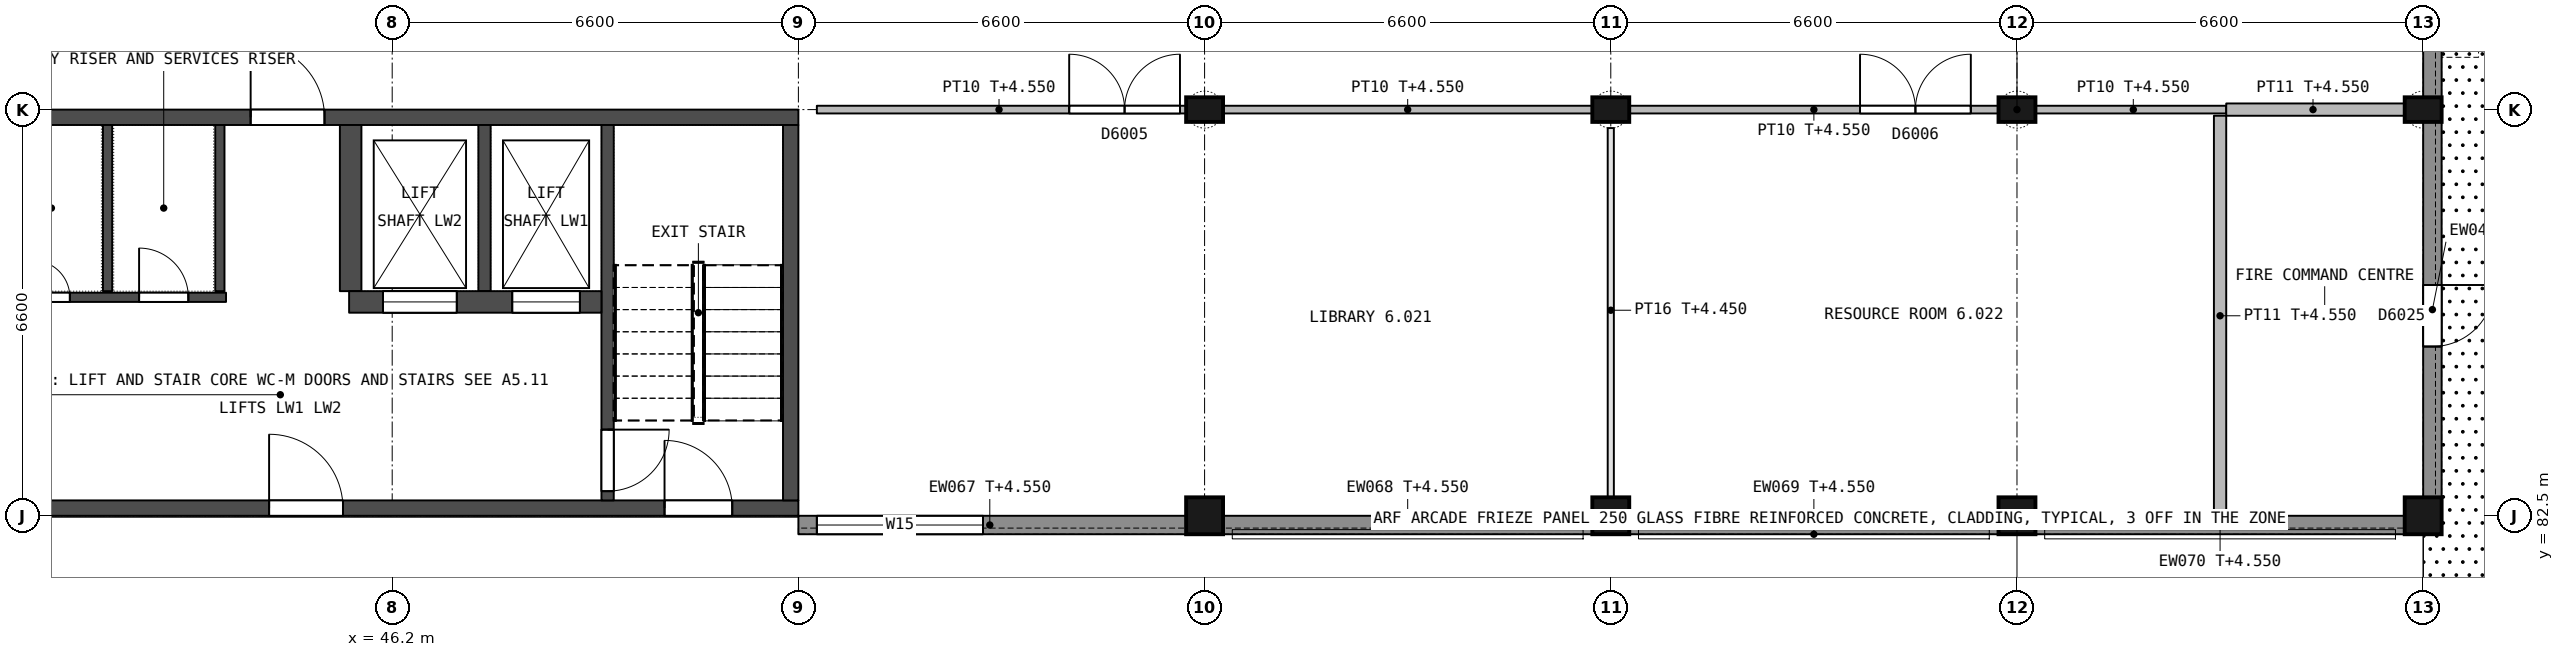
"""IFC4 building model, lengths in metres.
Left out: names, types, materials, properties, quantities, classifications, styles, units other than length and angle.
Written with IfcOpenShell. Run it as: python <this file> out.ifc"""

import sys

from ifc_helpers import new_model, si_unit, direction, frame, frame_2d, origin, origin_2d, place, context, subcontext, project, spatial, rectangle, extrude, element, fill, save


model = new_model("IFC4")
c1 = context("Model", 3, precision=1e-05, world=origin(), true_north=direction((0.0, 1.0)))
c2 = subcontext(c1, "Body", "Model", "MODEL_VIEW")
j1 = project(units=[si_unit("LENGTHUNIT", "METRE"), si_unit("PLANEANGLEUNIT", "RADIAN")], contexts=[c1])
p1 = place(None, origin())
s1 = spatial("IfcSite", under=j1, at=p1, CompositionType="ELEMENT")
p2 = place(p1, origin())
s2 = spatial("IfcBuilding", under=s1, at=p2, CompositionType="ELEMENT")
p3 = place(p2, origin())
s3 = spatial("IfcBuildingStorey", under=s2, at=p3, CompositionType="ELEMENT", Elevation=0.0)
p4 = place(p3, frame((59.4, 82.5, 0.0), z_axis=(0.0, 0.0, 1.0), x_axis=(1.0, 0.0, 0.0)))
e1 = element("IfcColumn", 1, at=p4, inside=s3, PredefinedType="COLUMN", context=c2, shape_type="SweptSolid", body=[
    extrude(rectangle(XDim=0.6, YDim=0.6, at=origin_2d()), origin(), (0.0, 0.0, 1.0), 5.4),
])
p5 = place(p3, frame((59.4, 89.1, 0.0), z_axis=(0.0, 0.0, 1.0), x_axis=(1.0, 0.0, 0.0)))
e2 = element("IfcColumn", 2, at=p5, inside=s3, PredefinedType="COLUMN", context=c2, shape_type="SweptSolid", body=[
    extrude(rectangle(XDim=0.6, YDim=0.4, at=origin_2d()), origin(), (0.0, 0.0, 1.0), 5.4),
])
p6 = place(p3, frame((66.0, 82.5, 0.0), z_axis=(0.0, 0.0, 1.0), x_axis=(1.0, 0.0, 0.0)))
e3 = element("IfcColumn", 3, at=p6, inside=s3, PredefinedType="COLUMN", context=c2, shape_type="SweptSolid", body=[
    extrude(rectangle(XDim=0.6, YDim=0.6, at=origin_2d()), origin(), (0.0, 0.0, 1.0), 5.4),
])
p7 = place(p3, frame((66.0, 89.1, 0.0), z_axis=(0.0, 0.0, 1.0), x_axis=(1.0, 0.0, 0.0)))
e4 = element("IfcColumn", 4, at=p7, inside=s3, PredefinedType="COLUMN", context=c2, shape_type="SweptSolid", body=[
    extrude(rectangle(XDim=0.6, YDim=0.4, at=origin_2d()), origin(), (0.0, 0.0, 1.0), 5.4),
])
p8 = place(p3, frame((72.6, 82.5, 0.0), z_axis=(0.0, 0.0, 1.0), x_axis=(1.0, 0.0, 0.0)))
e5 = element("IfcColumn", 5, at=p8, inside=s3, PredefinedType="COLUMN", context=c2, shape_type="SweptSolid", body=[
    extrude(rectangle(XDim=0.6, YDim=0.6, at=origin_2d()), origin(), (0.0, 0.0, 1.0), 5.4),
])
p9 = place(p3, frame((72.6, 89.1, 0.0), z_axis=(0.0, 0.0, 1.0), x_axis=(1.0, 0.0, 0.0)))
e6 = element("IfcColumn", 6, at=p9, inside=s3, PredefinedType="COLUMN", context=c2, shape_type="SweptSolid", body=[
    extrude(rectangle(XDim=0.6, YDim=0.4, at=origin_2d()), origin(), (0.0, 0.0, 1.0), 5.4),
])
p10 = place(p3, frame((79.2, 82.5, 0.0), z_axis=(0.0, 0.0, 1.0), x_axis=(1.0, 0.0, 0.0)))
e7 = element("IfcColumn", 7, at=p10, inside=s3, PredefinedType="COLUMN", context=c2, shape_type="SweptSolid", body=[
    extrude(rectangle(XDim=0.6, YDim=0.6, at=origin_2d()), origin(), (0.0, 0.0, 1.0), 5.4),
])
p11 = place(p3, frame((79.2, 89.1, 0.0), z_axis=(0.0, 0.0, 1.0), x_axis=(1.0, 0.0, 0.0)))
e8 = element("IfcColumn", 8, at=p11, inside=s3, PredefinedType="COLUMN", context=c2, shape_type="SweptSolid", body=[
    extrude(rectangle(XDim=0.6, YDim=0.4, at=origin_2d()), origin(), (0.0, 0.0, 1.0), 5.4),
])
p12 = place(p3, frame((52.8, 88.975, 0.0), z_axis=(0.0, 0.0, 1.0), x_axis=(-1.0, 0.0, 0.0)))
e9 = element("IfcWall", 9, at=p12, inside=s3, PredefinedType="SHEAR", context=c2, shape_type="SweptSolid", body=[
    extrude(rectangle(XDim=13.2, YDim=0.25, at=frame_2d((6.6, 0.0))), origin(), (0.0, 0.0, 1.0), 5.15),
])
p13 = place(p12, frame((7.7, 0.0, 0.0)))
e10 = element("IfcOpeningElement", 10, at=p13, cuts=e9, PredefinedType="OPENING", context=c2, shape_type="SweptSolid", body=[
    extrude(rectangle(XDim=1.2, YDim=2.1, at=frame_2d((0.6, 1.05))), frame((0.0, 0.135, 0.0), z_axis=(0.0, -1.0, 0.0), x_axis=(1.0, 0.0, 0.0)), (0.0, 0.0, 1.0), 0.27),
])
p14 = place(p3, frame((52.8, 82.625, 0.0), z_axis=(0.0, 0.0, 1.0), x_axis=(-1.0, 0.0, 0.0)))
e11 = element("IfcWall", 11, at=p14, inside=s3, PredefinedType="SHEAR", context=c2, shape_type="SweptSolid", body=[
    extrude(rectangle(XDim=13.2, YDim=0.25, at=frame_2d((6.6, 0.0))), origin(), (0.0, 0.0, 1.0), 5.15),
])
p15 = place(p14, frame((7.4, 0.0, 0.0)))
e12 = element("IfcOpeningElement", 12, at=p15, cuts=e11, PredefinedType="OPENING", context=c2, shape_type="SweptSolid", body=[
    extrude(rectangle(XDim=1.2, YDim=2.4, at=frame_2d((0.6, 1.2))), frame((0.0, 0.135, 0.0), z_axis=(0.0, -1.0, 0.0), x_axis=(1.0, 0.0, 0.0)), (0.0, 0.0, 1.0), 0.27),
])
p16 = place(p14, frame((1.075, 0.0, 0.0)))
e13 = element("IfcOpeningElement", 13, at=p16, cuts=e11, PredefinedType="OPENING", context=c2, shape_type="SweptSolid", body=[
    extrude(rectangle(XDim=1.1, YDim=2.4, at=frame_2d((0.55, 1.2))), frame((0.0, 0.135, 0.0), z_axis=(0.0, -1.0, 0.0), x_axis=(1.0, 0.0, 0.0)), (0.0, 0.0, 1.0), 0.27),
])
p17 = place(p3, frame((52.675, 88.85, 0.0), z_axis=(0.0, 0.0, 1.0), x_axis=(0.0, -1.0, 0.0)))
e14 = element("IfcWall", 14, at=p17, inside=s3, PredefinedType="SHEAR", context=c2, shape_type="SweptSolid", body=[
    extrude(rectangle(XDim=6.1, YDim=0.25, at=frame_2d((3.05, 0.0))), origin(), (0.0, 0.0, 1.0), 5.15),
])
p18 = place(p3, frame((49.7, 88.85, 0.0), z_axis=(0.0, 0.0, 1.0), x_axis=(0.0, -1.0, 0.0)))
e15 = element("IfcWall", 15, at=p18, inside=s3, PredefinedType="SHEAR", context=c2, shape_type="SweptSolid", body=[
    extrude(rectangle(XDim=6.1, YDim=0.2, at=frame_2d((3.05, 0.0))), origin(), (0.0, 0.0, 1.0), 5.15),
])
p19 = place(p18, frame((4.95, 0.0, 0.0)))
e16 = element("IfcOpeningElement", 16, at=p19, cuts=e15, PredefinedType="OPENING", context=c2, shape_type="SweptSolid", body=[
    extrude(rectangle(XDim=1.0, YDim=2.2, at=frame_2d((0.5, 1.1))), frame((0.0, 0.11, 0.0), z_axis=(0.0, -1.0, 0.0), x_axis=(1.0, 0.0, 0.0)), (0.0, 0.0, 1.0), 0.22),
])
p20 = place(p3, frame((47.7, 88.85, 0.0), z_axis=(0.0, 0.0, 1.0), x_axis=(0.0, -1.0, 0.0)))
e17 = element("IfcWall", 17, at=p20, inside=s3, PredefinedType="SHEAR", context=c2, shape_type="SweptSolid", body=[
    extrude(rectangle(XDim=2.7, YDim=0.2, at=frame_2d((1.35, 0.0))), origin(), (0.0, 0.0, 1.0), 5.15),
])
p21 = place(p3, frame((45.525, 88.85, 0.0), z_axis=(0.0, 0.0, 1.0), x_axis=(0.0, -1.0, 0.0)))
e18 = element("IfcWall", 18, at=p21, inside=s3, PredefinedType="SHEAR", context=c2, shape_type="SweptSolid", body=[
    extrude(rectangle(XDim=2.7, YDim=0.35, at=frame_2d((1.35, 0.0))), origin(), (0.0, 0.0, 1.0), 5.15),
])
p22 = place(p3, frame((49.6, 85.975, 0.0), z_axis=(0.0, 0.0, 1.0), x_axis=(-1.0, 0.0, 0.0)))
e19 = element("IfcWall", 19, at=p22, inside=s3, PredefinedType="SHEAR", context=c2, shape_type="SweptSolid", body=[
    extrude(rectangle(XDim=4.1, YDim=0.35, at=frame_2d((2.05, 0.0))), origin(), (0.0, 0.0, 1.0), 5.15),
])
p23 = place(p22, frame((0.35, 0.0, 0.0)))
e20 = element("IfcOpeningElement", 20, at=p23, cuts=e19, PredefinedType="OPENING", context=c2, shape_type="SweptSolid", body=[
    extrude(rectangle(XDim=1.1, YDim=2.2, at=frame_2d((0.55, 1.1))), frame((0.0, 0.185, 0.0), z_axis=(0.0, -1.0, 0.0), x_axis=(1.0, 0.0, 0.0)), (0.0, 0.0, 1.0), 0.37),
])
p24 = place(p22, frame((2.35, 0.0, 0.0)))
e21 = element("IfcOpeningElement", 21, at=p24, cuts=e19, PredefinedType="OPENING", context=c2, shape_type="SweptSolid", body=[
    extrude(rectangle(XDim=1.2, YDim=2.3, at=frame_2d((0.6, 1.15))), frame((0.0, 0.185, 0.0), z_axis=(0.0, -1.0, 0.0), x_axis=(1.0, 0.0, 0.0)), (0.0, 0.0, 1.0), 0.37),
])
p25 = place(p3, frame((43.4, 88.85, 0.0), z_axis=(0.0, 0.0, 1.0), x_axis=(0.0, -1.0, 0.0)))
e22 = element("IfcWall", 22, at=p25, inside=s3, PredefinedType="SHEAR", context=c2, shape_type="SweptSolid", body=[
    extrude(rectangle(XDim=2.7, YDim=0.15, at=frame_2d((1.35, 0.0))), origin(), (0.0, 0.0, 1.0), 5.15),
])
p26 = place(p3, frame((43.5, 86.05, 0.0), z_axis=(0.0, 0.0, 1.0), x_axis=(-1.0, 0.0, 0.0)))
e23 = element("IfcWall", 23, at=p26, inside=s3, PredefinedType="SHEAR", context=c2, shape_type="SweptSolid", body=[
    extrude(rectangle(XDim=3.65, YDim=0.15, at=frame_2d((1.825, 0.0))), origin(), (0.0, 0.0, 1.0), 5.15),
])
p27 = place(p26, frame((0.613, 0.0, 0.0)))
e24 = element("IfcOpeningElement", 24, at=p27, cuts=e23, PredefinedType="OPENING", context=c2, shape_type="SweptSolid", body=[
    extrude(rectangle(XDim=0.8, YDim=2.0, at=frame_2d((0.4, 1.0))), frame((0.0, 0.085, 0.0), z_axis=(0.0, -1.0, 0.0), x_axis=(1.0, 0.0, 0.0)), (0.0, 0.0, 1.0), 0.17),
])
p28 = place(p26, frame((2.538, 0.0, 0.0)))
e25 = element("IfcOpeningElement", 25, at=p28, cuts=e23, PredefinedType="OPENING", context=c2, shape_type="SweptSolid", body=[
    extrude(rectangle(XDim=0.6, YDim=2.1, at=frame_2d((0.3, 1.05))), frame((0.0, 0.085, 0.0), z_axis=(0.0, -1.0, 0.0), x_axis=(1.0, 0.0, 0.0)), (0.0, 0.0, 1.0), 0.17),
])
p29 = place(p3, frame((41.575, 88.85, 0.0), z_axis=(0.0, 0.0, 1.0), x_axis=(0.0, -1.0, 0.0)))
e26 = element("IfcWall", 26, at=p29, inside=s3, PredefinedType="SHEAR", context=c2, shape_type="SweptSolid", body=[
    extrude(rectangle(XDim=2.7, YDim=0.15, at=frame_2d((1.35, 0.0))), origin(), (0.0, 0.0, 1.0), 5.15),
])
p30 = place(p3, frame((79.35, 88.9, 0.0), z_axis=(0.0, 0.0, 1.0), x_axis=(0.0, -1.0, 0.0)))
e27 = element("IfcWall", 27, at=p30, inside=s3, PredefinedType="STANDARD", context=c2, shape_type="SweptSolid", body=[
    extrude(rectangle(XDim=6.1, YDim=0.3, at=frame_2d((3.05, 0.0))), origin(), (0.0, 0.0, 1.0), 4.55),
])
p31 = place(p30, frame((2.65, 0.0, 0.0)))
e28 = element("IfcOpeningElement", 28, at=p31, cuts=e27, PredefinedType="OPENING", context=c2, shape_type="SweptSolid", body=[
    extrude(rectangle(XDim=1.0, YDim=2.1, at=frame_2d((0.5, 1.05))), frame((0.0, 0.16, 0.0), z_axis=(0.0, -1.0, 0.0), x_axis=(1.0, 0.0, 0.0)), (0.0, 0.0, 1.0), 0.32),
])
p32 = place(p3, frame((79.35, 92.4, 0.0), z_axis=(0.0, 0.0, 1.0), x_axis=(0.0, -1.0, 0.0)))
e29 = element("IfcWall", 29, at=p32, inside=s3, PredefinedType="STANDARD", context=c2, shape_type="SweptSolid", body=[
    extrude(rectangle(XDim=3.1, YDim=0.3, at=frame_2d((1.55, 0.0))), origin(), (0.0, 0.0, 1.0), 4.55),
])
p33 = place(p32, frame((1.05, 0.0, 1.1)))
e30 = element("IfcOpeningElement", 30, at=p33, cuts=e29, PredefinedType="OPENING", context=c2, shape_type="SweptSolid", body=[
    extrude(rectangle(XDim=1.2, YDim=1.2, at=frame_2d((0.6, 0.6))), frame((0.0, 0.16, 0.0), z_axis=(0.0, -1.0, 0.0), x_axis=(1.0, 0.0, 0.0)), (0.0, 0.0, 1.0), 0.32),
])
p34 = place(p3, frame((59.1, 82.35, 0.0), z_axis=(0.0, 0.0, 1.0), x_axis=(-1.0, 0.0, 0.0)))
e31 = element("IfcWall", 31, at=p34, inside=s3, PredefinedType="STANDARD", context=c2, shape_type="SweptSolid", body=[
    extrude(rectangle(XDim=6.3, YDim=0.3, at=frame_2d((3.15, 0.0))), origin(), (0.0, 0.0, 1.0), 4.55),
])
p35 = place(p34, frame((3.3, 0.0, 0.6)))
e32 = element("IfcOpeningElement", 32, at=p35, cuts=e31, PredefinedType="OPENING", context=c2, shape_type="SweptSolid", body=[
    extrude(rectangle(XDim=2.7, YDim=2.1, at=frame_2d((1.35, 1.05))), frame((0.0, 0.16, 0.0), z_axis=(0.0, -1.0, 0.0), x_axis=(1.0, 0.0, 0.0)), (0.0, 0.0, 1.0), 0.32),
])
for number, where, z_axis, x_axis in (
    (33, (65.7, 82.35, 0.0), (0.0, 0.0, 1.0), (-1.0, 0.0, 0.0)),
    (34, (72.3, 82.35, 0.0), (0.0, 0.0, 1.0), (-1.0, 0.0, 0.0)),
    (35, (78.9, 82.35, 0.0), (0.0, 0.0, 1.0), (-1.0, 0.0, 0.0)),
):
    element("IfcWall", number, at=place(p3, frame(where, z_axis=z_axis, x_axis=x_axis)), inside=s3, PredefinedType="STANDARD", context=c2, shape_type="SweptSolid", body=[
        extrude(rectangle(XDim=6.0, YDim=0.3, at=frame_2d((3.0, 0.0))), origin(), (0.0, 0.0, 1.0), 4.55),
    ])
p36 = place(p3, frame((53.1, 89.1, 0.0), z_axis=(0.0, 0.0, 1.0), x_axis=(1.0, 0.0, 0.0)))
e36 = element("IfcWall", 36, at=p36, inside=s3, PredefinedType="PARTITIONING", context=c2, shape_type="SweptSolid", body=[
    extrude(rectangle(XDim=6.0, YDim=0.125, at=frame_2d((3.0, 0.0))), origin(), (0.0, 0.0, 1.0), 4.55),
])
p37 = place(p36, frame((4.1, 0.0, 0.0)))
e37 = element("IfcOpeningElement", 37, at=p37, cuts=e36, PredefinedType="OPENING", context=c2, shape_type="SweptSolid", body=[
    extrude(rectangle(XDim=1.8, YDim=2.1, at=frame_2d((0.9, 1.05))), frame((0.0, 0.073, 0.0), z_axis=(0.0, -1.0, 0.0), x_axis=(1.0, 0.0, 0.0)), (0.0, 0.0, 1.0), 0.145),
])
p38 = place(p3, frame((59.7, 89.1, 0.0), z_axis=(0.0, 0.0, 1.0), x_axis=(1.0, 0.0, 0.0)))
e38 = element("IfcWall", 38, at=p38, inside=s3, PredefinedType="PARTITIONING", context=c2, shape_type="SweptSolid", body=[
    extrude(rectangle(XDim=6.0, YDim=0.125, at=frame_2d((3.0, 0.0))), origin(), (0.0, 0.0, 1.0), 4.55),
])
p39 = place(p3, frame((66.3, 89.1, 0.0), z_axis=(0.0, 0.0, 1.0), x_axis=(1.0, 0.0, 0.0)))
e39 = element("IfcWall", 39, at=p39, inside=s3, PredefinedType="PARTITIONING", context=c2, shape_type="SweptSolid", body=[
    extrude(rectangle(XDim=6.0, YDim=0.125, at=frame_2d((3.0, 0.0))), origin(), (0.0, 0.0, 1.0), 4.55),
])
p40 = place(p39, frame((3.75, 0.0, 0.0)))
e40 = element("IfcOpeningElement", 40, at=p40, cuts=e39, PredefinedType="OPENING", context=c2, shape_type="SweptSolid", body=[
    extrude(rectangle(XDim=1.8, YDim=2.1, at=frame_2d((0.9, 1.05))), frame((0.0, 0.073, 0.0), z_axis=(0.0, -1.0, 0.0), x_axis=(1.0, 0.0, 0.0)), (0.0, 0.0, 1.0), 0.145),
])
p41 = place(p3, frame((72.9, 89.1, 0.0), z_axis=(0.0, 0.0, 1.0), x_axis=(1.0, 0.0, 0.0)))
e41 = element("IfcWall", 41, at=p41, inside=s3, PredefinedType="PARTITIONING", context=c2, shape_type="SweptSolid", body=[
    extrude(rectangle(XDim=3.1, YDim=0.125, at=frame_2d((1.55, 0.0))), origin(), (0.0, 0.0, 1.0), 4.55),
])
p42 = place(p3, frame((76.0, 89.1, 0.0), z_axis=(0.0, 0.0, 1.0), x_axis=(1.0, 0.0, 0.0)))
e42 = element("IfcWall", 42, at=p42, inside=s3, PredefinedType="PARTITIONING", context=c2, shape_type="SweptSolid", body=[
    extrude(rectangle(XDim=2.9, YDim=0.2, at=frame_2d((1.45, 0.0))), origin(), (0.0, 0.0, 1.0), 4.55),
])
p43 = place(p3, frame((66.0, 82.8, 0.0), z_axis=(0.0, 0.0, 1.0), x_axis=(0.0, 1.0, 0.0)))
e43 = element("IfcWall", 43, at=p43, inside=s3, PredefinedType="PARTITIONING", context=c2, shape_type="SweptSolid", body=[
    extrude(rectangle(XDim=6.0, YDim=0.1, at=frame_2d((3.0, 0.0))), origin(), (0.0, 0.0, 1.0), 4.45),
])
p44 = place(p3, frame((75.9, 82.5, 0.0), z_axis=(0.0, 0.0, 1.0), x_axis=(0.0, 1.0, 0.0)))
e44 = element("IfcWall", 44, at=p44, inside=s3, PredefinedType="PARTITIONING", context=c2, shape_type="SweptSolid", body=[
    extrude(rectangle(XDim=6.5, YDim=0.2, at=frame_2d((3.25, 0.0))), origin(), (0.0, 0.0, 1.0), 4.55),
])
p45 = place(p13, origin())
e45 = element("IfcDoor", 45, at=p45, inside=s3, OperationType="SINGLE_SWING_RIGHT", PredefinedType="DOOR", context=c2, shape_type="SweptSolid", body=[
    extrude(rectangle(XDim=1.2, YDim=2.1, at=frame_2d((0.6, 1.05))), frame((0.0, 0.025, 0.0), z_axis=(0.0, -1.0, 0.0), x_axis=(1.0, 0.0, 0.0)), (0.0, 0.0, 1.0), 0.05),
])
fill(e10, e45)
p46 = place(p27, origin())
e46 = element("IfcDoor", 46, at=p46, inside=s3, OperationType="SINGLE_SWING_RIGHT", PredefinedType="DOOR", context=c2, shape_type="SweptSolid", body=[
    extrude(rectangle(XDim=0.8, YDim=2.0, at=frame_2d((0.4, 1.0))), frame((0.0, 0.025, 0.0), z_axis=(0.0, -1.0, 0.0), x_axis=(1.0, 0.0, 0.0)), (0.0, 0.0, 1.0), 0.05),
])
fill(e24, e46)
p47 = place(p28, origin())
e47 = element("IfcDoor", 47, at=p47, inside=s3, OperationType="SINGLE_SWING_RIGHT", PredefinedType="DOOR", context=c2, shape_type="SweptSolid", body=[
    extrude(rectangle(XDim=0.6, YDim=2.1, at=frame_2d((0.3, 1.05))), frame((0.0, 0.025, 0.0), z_axis=(0.0, -1.0, 0.0), x_axis=(1.0, 0.0, 0.0)), (0.0, 0.0, 1.0), 0.05),
])
fill(e25, e47)
p48 = place(p15, origin())
e48 = element("IfcDoor", 48, at=p48, inside=s3, OperationType="SINGLE_SWING_RIGHT", PredefinedType="DOOR", context=c2, shape_type="SweptSolid", body=[
    extrude(rectangle(XDim=1.2, YDim=2.4, at=frame_2d((0.6, 1.2))), frame((0.0, 0.025, 0.0), z_axis=(0.0, -1.0, 0.0), x_axis=(1.0, 0.0, 0.0)), (0.0, 0.0, 1.0), 0.05),
])
fill(e12, e48)
p49 = place(p19, origin())
e49 = element("IfcDoor", 49, at=p49, inside=s3, OperationType="SINGLE_SWING_LEFT", PredefinedType="DOOR", context=c2, shape_type="SweptSolid", body=[
    extrude(rectangle(XDim=1.0, YDim=2.2, at=frame_2d((0.5, 1.1))), frame((0.0, 0.025, 0.0), z_axis=(0.0, -1.0, 0.0), x_axis=(1.0, 0.0, 0.0)), (0.0, 0.0, 1.0), 0.05),
])
fill(e16, e49)
p50 = place(p16, origin())
e50 = element("IfcDoor", 50, at=p50, inside=s3, OperationType="SINGLE_SWING_RIGHT", PredefinedType="DOOR", context=c2, shape_type="SweptSolid", body=[
    extrude(rectangle(XDim=1.1, YDim=2.4, at=frame_2d((0.55, 1.2))), frame((0.0, 0.025, 0.0), z_axis=(0.0, -1.0, 0.0), x_axis=(1.0, 0.0, 0.0)), (0.0, 0.0, 1.0), 0.05),
])
fill(e13, e50)
p51 = place(p23, origin())
e51 = element("IfcDoor", 51, at=p51, inside=s3, OperationType="DOUBLE_DOOR_SLIDING", PredefinedType="NOTDEFINED", context=c2, shape_type="SweptSolid", body=[
    extrude(rectangle(XDim=1.1, YDim=2.2, at=frame_2d((0.55, 1.1))), frame((0.0, 0.025, 0.0), z_axis=(0.0, -1.0, 0.0), x_axis=(1.0, 0.0, 0.0)), (0.0, 0.0, 1.0), 0.05),
])
fill(e20, e51)
p52 = place(p24, origin())
e52 = element("IfcDoor", 52, at=p52, inside=s3, OperationType="DOUBLE_DOOR_SLIDING", PredefinedType="NOTDEFINED", context=c2, shape_type="SweptSolid", body=[
    extrude(rectangle(XDim=1.2, YDim=2.3, at=frame_2d((0.6, 1.15))), frame((0.0, 0.025, 0.0), z_axis=(0.0, -1.0, 0.0), x_axis=(1.0, 0.0, 0.0)), (0.0, 0.0, 1.0), 0.05),
])
fill(e21, e52)
p53 = place(p35, origin())
e53 = element("IfcWindow", 53, at=p53, inside=s3, PartitioningType="SINGLE_PANEL", PredefinedType="WINDOW", context=c2, shape_type="SweptSolid", body=[
    extrude(rectangle(XDim=2.7, YDim=2.1, at=frame_2d((1.35, 1.05))), frame((0.0, 0.03, 0.0), z_axis=(0.0, -1.0, 0.0), x_axis=(1.0, 0.0, 0.0)), (0.0, 0.0, 1.0), 0.06),
])
fill(e32, e53)
p54 = place(p37, origin())
e54 = element("IfcDoor", 54, at=p54, inside=s3, OperationType="DOUBLE_DOOR_SINGLE_SWING", PredefinedType="DOOR", context=c2, shape_type="SweptSolid", body=[
    extrude(rectangle(XDim=1.8, YDim=2.1, at=frame_2d((0.9, 1.05))), frame((0.0, 0.025, 0.0), z_axis=(0.0, -1.0, 0.0), x_axis=(1.0, 0.0, 0.0)), (0.0, 0.0, 1.0), 0.05),
])
fill(e37, e54)
p55 = place(p40, origin())
e55 = element("IfcDoor", 55, at=p55, inside=s3, OperationType="DOUBLE_DOOR_SINGLE_SWING", PredefinedType="DOOR", context=c2, shape_type="SweptSolid", body=[
    extrude(rectangle(XDim=1.8, YDim=2.1, at=frame_2d((0.9, 1.05))), frame((0.0, 0.025, 0.0), z_axis=(0.0, -1.0, 0.0), x_axis=(1.0, 0.0, 0.0)), (0.0, 0.0, 1.0), 0.05),
])
fill(e40, e55)
p56 = place(p31, origin())
e56 = element("IfcDoor", 56, at=p56, inside=s3, OperationType="SINGLE_SWING_LEFT", PredefinedType="DOOR", context=c2, shape_type="SweptSolid", body=[
    extrude(rectangle(XDim=1.0, YDim=2.1, at=frame_2d((0.5, 1.05))), frame((0.0, 0.025, 0.0), z_axis=(0.0, -1.0, 0.0), x_axis=(1.0, 0.0, 0.0)), (0.0, 0.0, 1.0), 0.05),
])
fill(e28, e56)
save(model, sys.argv[1])
